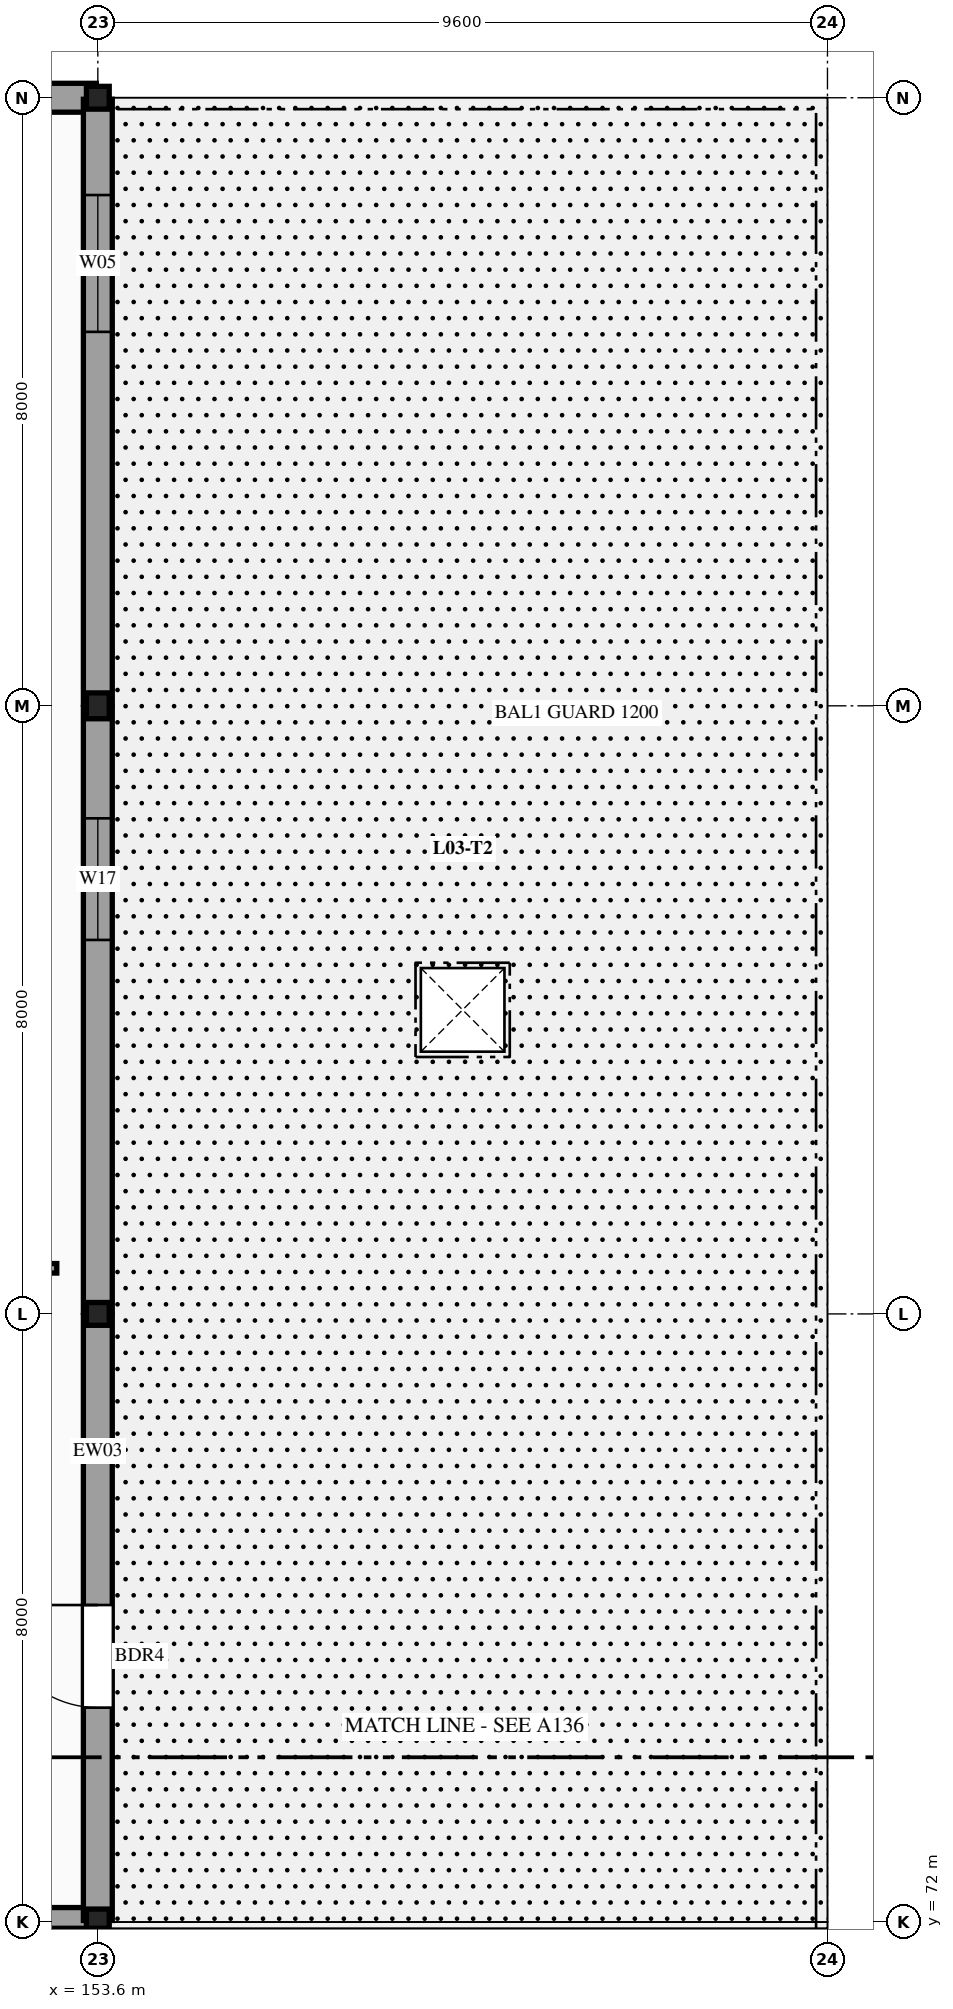
"""IFC4 building model, lengths in metres.
Left out: names, types, materials, properties, quantities, classifications, styles, units other than length and angle.
Written with IfcOpenShell. Run it as: python <this file> out.ifc"""

import sys

from ifc_helpers import new_model, si_unit, direction, frame, frame_2d, origin, origin_2d, place, context, subcontext, project, spatial, rectangle, i_section, extrude, element, fill, save


model = new_model("IFC4")
c1 = context("Model", 3, precision=1e-05, world=origin(), true_north=direction((0.0, 1.0)))
c2 = subcontext(c1, "Body", "Model", "MODEL_VIEW")
j1 = project(units=[si_unit("LENGTHUNIT", "METRE"), si_unit("PLANEANGLEUNIT", "RADIAN")], contexts=[c1])
p1 = place(None, origin())
s1 = spatial("IfcSite", under=j1, at=p1, CompositionType="ELEMENT")
p2 = place(p1, origin())
s2 = spatial("IfcBuilding", under=s1, at=p2, CompositionType="ELEMENT")
p3 = place(p2, frame((0.0, 0.0, 12.9)))
s3 = spatial("IfcBuildingStorey", under=s2, at=p3, CompositionType="ELEMENT", Elevation=12.9)
p4 = place(p3, frame((153.6, 72.0, -0.26), z_axis=(0.0, 0.0, 1.0), x_axis=(1.0, 0.0, 0.0)))
e1 = element("IfcColumn", 1, at=p4, inside=s3, PredefinedType="COLUMN", context=c2, shape_type="SweptSolid", body=[
    extrude(i_section(OverallWidth=0.3, OverallDepth=0.34, WebThickness=0.012, FlangeThickness=0.021, FilletRadius=0.027, at=origin_2d()), origin(), (0.0, 0.0, 1.0), 4.48),
])
p5 = place(p3, frame((153.6, 80.0, -0.26), z_axis=(0.0, 0.0, 1.0), x_axis=(1.0, 0.0, 0.0)))
e2 = element("IfcColumn", 2, at=p5, inside=s3, PredefinedType="COLUMN", context=c2, shape_type="SweptSolid", body=[
    extrude(i_section(OverallWidth=0.3, OverallDepth=0.3, WebThickness=0.011, FlangeThickness=0.019, FilletRadius=0.027, at=origin_2d()), origin(), (0.0, 0.0, 1.0), 4.48),
])
p6 = place(p3, frame((153.6, 88.0, -0.26), z_axis=(0.0, 0.0, 1.0), x_axis=(1.0, 0.0, 0.0)))
e3 = element("IfcColumn", 3, at=p6, inside=s3, PredefinedType="COLUMN", context=c2, shape_type="SweptSolid", body=[
    extrude(i_section(OverallWidth=0.3, OverallDepth=0.34, WebThickness=0.012, FlangeThickness=0.021, FilletRadius=0.027, at=origin_2d()), origin(), (0.0, 0.0, 1.0), 4.48),
])
p7 = place(p3, frame((153.6, 96.0, -0.26), z_axis=(0.0, 0.0, 1.0), x_axis=(1.0, 0.0, 0.0)))
e4 = element("IfcColumn", 4, at=p7, inside=s3, PredefinedType="COLUMN", context=c2, shape_type="SweptSolid", body=[
    extrude(i_section(OverallWidth=0.3, OverallDepth=0.3, WebThickness=0.011, FlangeThickness=0.019, FilletRadius=0.027, at=origin_2d()), origin(), (0.0, 0.0, 1.0), 4.48),
])
p8 = place(p3, frame((144.02, 72.0, 0.0), z_axis=(0.0, 0.0, 1.0), x_axis=(1.0, 0.0, 0.0)))
e5 = element("IfcWall", 5, at=p8, inside=s3, PredefinedType="SOLIDWALL", context=c2, shape_type="SweptSolid", body=[
    extrude(rectangle(XDim=9.56, YDim=0.38, at=frame_2d((4.78, 0.0))), origin(), (0.0, 0.0, 1.0), 3.54),
])
p9 = place(p8, frame((3.65, 0.0, 0.0)))
e6 = element("IfcOpeningElement", 6, at=p9, cuts=e5, PredefinedType="OPENING", context=c2, shape_type="SweptSolid", body=[
    extrude(rectangle(XDim=1.5, YDim=2.2, at=frame_2d((0.75, 1.1))), frame((0.0, 0.2, 0.0), z_axis=(0.0, -1.0, 0.0), x_axis=(1.0, 0.0, 0.0)), (0.0, 0.0, 1.0), 0.4),
])
p10 = place(p3, frame((144.02, 96.0, 0.0), z_axis=(0.0, 0.0, 1.0), x_axis=(1.0, 0.0, 0.0)))
e7 = element("IfcWall", 7, at=p10, inside=s3, PredefinedType="SOLIDWALL", context=c2, shape_type="SweptSolid", body=[
    extrude(rectangle(XDim=9.56, YDim=0.38, at=frame_2d((4.78, 0.0))), origin(), (0.0, 0.0, 1.0), 3.54),
])
p11 = place(p10, frame((0.85, 0.0, 0.85)))
e8 = element("IfcOpeningElement", 8, at=p11, cuts=e7, PredefinedType="OPENING", context=c2, shape_type="SweptSolid", body=[
    extrude(rectangle(XDim=2.0, YDim=2.2, at=frame_2d((1.0, 1.1))), frame((0.0, 0.2, 0.0), z_axis=(0.0, -1.0, 0.0), x_axis=(1.0, 0.0, 0.0)), (0.0, 0.0, 1.0), 0.4),
])
p12 = place(p10, frame((5.95, 0.0, 0.85)))
e9 = element("IfcOpeningElement", 9, at=p12, cuts=e7, PredefinedType="OPENING", context=c2, shape_type="SweptSolid", body=[
    extrude(rectangle(XDim=2.0, YDim=2.2, at=frame_2d((1.0, 1.1))), frame((0.0, 0.2, 0.0), z_axis=(0.0, -1.0, 0.0), x_axis=(1.0, 0.0, 0.0)), (0.0, 0.0, 1.0), 0.4),
])
p13 = place(p3, frame((153.6, 72.02, 0.0), z_axis=(0.0, 0.0, 1.0), x_axis=(0.0, 1.0, 0.0)))
e10 = element("IfcWall", 10, at=p13, inside=s3, PredefinedType="SOLIDWALL", context=c2, shape_type="SweptSolid", body=[
    extrude(rectangle(XDim=7.96, YDim=0.38, at=frame_2d((3.98, 0.0))), origin(), (0.0, 0.0, 1.0), 3.54),
])
p14 = place(p13, frame((2.8, 0.0, 0.0)))
e11 = element("IfcOpeningElement", 11, at=p14, cuts=e10, PredefinedType="OPENING", context=c2, shape_type="SweptSolid", body=[
    extrude(rectangle(XDim=1.35, YDim=2.2, at=frame_2d((0.675, 1.1))), frame((0.0, 0.2, 0.0), z_axis=(0.0, -1.0, 0.0), x_axis=(1.0, 0.0, 0.0)), (0.0, 0.0, 1.0), 0.4),
])
p15 = place(p3, frame((153.6, 80.02, 0.0), z_axis=(0.0, 0.0, 1.0), x_axis=(0.0, 1.0, 0.0)))
e12 = element("IfcWall", 12, at=p15, inside=s3, PredefinedType="SOLIDWALL", context=c2, shape_type="SweptSolid", body=[
    extrude(rectangle(XDim=7.96, YDim=0.38, at=frame_2d((3.98, 0.0))), origin(), (0.0, 0.0, 1.0), 3.54),
])
p16 = place(p15, frame((4.9, 0.0, 0.9)))
e13 = element("IfcOpeningElement", 13, at=p16, cuts=e12, PredefinedType="OPENING", context=c2, shape_type="SweptSolid", body=[
    extrude(rectangle(XDim=1.6, YDim=2.0, at=frame_2d((0.8, 1.0))), frame((0.0, 0.2, 0.0), z_axis=(0.0, -1.0, 0.0), x_axis=(1.0, 0.0, 0.0)), (0.0, 0.0, 1.0), 0.4),
])
p17 = place(p3, frame((153.6, 88.02, 0.0), z_axis=(0.0, 0.0, 1.0), x_axis=(0.0, 1.0, 0.0)))
e14 = element("IfcWall", 14, at=p17, inside=s3, PredefinedType="SOLIDWALL", context=c2, shape_type="SweptSolid", body=[
    extrude(rectangle(XDim=7.96, YDim=0.38, at=frame_2d((3.98, 0.0))), origin(), (0.0, 0.0, 1.0), 3.54),
])
p18 = place(p17, frame((4.9, 0.0, 0.9)))
e15 = element("IfcOpeningElement", 15, at=p18, cuts=e14, PredefinedType="OPENING", context=c2, shape_type="SweptSolid", body=[
    extrude(rectangle(XDim=1.8, YDim=2.4, at=frame_2d((0.9, 1.2))), frame((0.0, 0.2, 0.0), z_axis=(0.0, -1.0, 0.0), x_axis=(1.0, 0.0, 0.0)), (0.0, 0.0, 1.0), 0.4),
])
p19 = place(p3, frame((140.34, 80.6, 0.0), z_axis=(0.0, 0.0, 1.0), x_axis=(1.0, 0.0, 0.0)))
e16 = element("IfcWall", 16, at=p19, inside=s3, PredefinedType="PARTITIONING", context=c2, shape_type="SweptSolid", body=[
    extrude(rectangle(XDim=12.72, YDim=0.125, at=frame_2d((6.36, 0.0))), origin(), (0.0, 0.0, 1.0), 3.38),
])
p20 = place(p19, frame((7.91, 0.0, 0.0)))
e17 = element("IfcOpeningElement", 17, at=p20, cuts=e16, PredefinedType="OPENING", context=c2, shape_type="SweptSolid", body=[
    extrude(rectangle(XDim=1.15, YDim=2.2, at=frame_2d((0.575, 1.1))), frame((0.0, 0.073, 0.0), z_axis=(0.0, -1.0, 0.0), x_axis=(1.0, 0.0, 0.0)), (0.0, 0.0, 1.0), 0.145),
])
p21 = place(p14, origin())
e18 = element("IfcDoor", 18, at=p21, inside=s3, OperationType="SINGLE_SWING_RIGHT", PredefinedType="DOOR", context=c2, shape_type="SweptSolid", body=[
    extrude(rectangle(XDim=1.35, YDim=2.2, at=frame_2d((0.675, 1.1))), frame((0.0, 0.025, 0.0), z_axis=(0.0, -1.0, 0.0), x_axis=(1.0, 0.0, 0.0)), (0.0, 0.0, 1.0), 0.05),
])
fill(e11, e18)
p22 = place(p16, origin())
e19 = element("IfcWindow", 19, at=p22, inside=s3, PartitioningType="SINGLE_PANEL", PredefinedType="WINDOW", context=c2, shape_type="SweptSolid", body=[
    extrude(rectangle(XDim=1.6, YDim=2.0, at=frame_2d((0.8, 1.0))), frame((0.0, 0.03, 0.0), z_axis=(0.0, -1.0, 0.0), x_axis=(1.0, 0.0, 0.0)), (0.0, 0.0, 1.0), 0.06),
])
fill(e13, e19)
p23 = place(p18, origin())
e20 = element("IfcWindow", 20, at=p23, inside=s3, PartitioningType="SINGLE_PANEL", PredefinedType="WINDOW", context=c2, shape_type="SweptSolid", body=[
    extrude(rectangle(XDim=1.8, YDim=2.4, at=frame_2d((0.9, 1.2))), frame((0.0, 0.03, 0.0), z_axis=(0.0, -1.0, 0.0), x_axis=(1.0, 0.0, 0.0)), (0.0, 0.0, 1.0), 0.06),
])
fill(e15, e20)
save(model, sys.argv[1])
